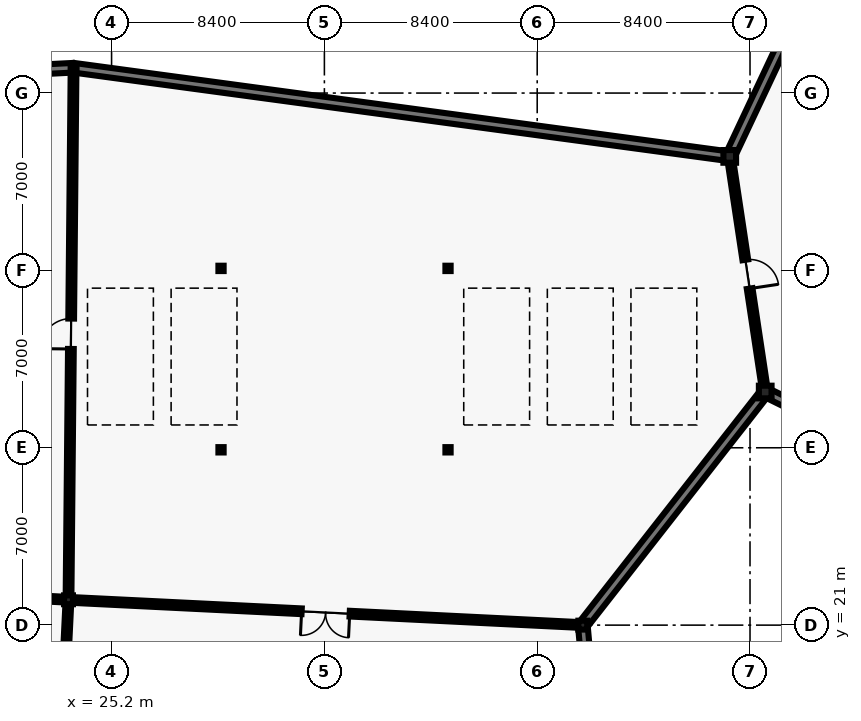
"""IFC4 building model, lengths in metres.
Left out: names, types, materials, properties, quantities, classifications, styles, units other than length and angle.
Written with IfcOpenShell. Run it as: python <this file> out.ifc"""

import sys

from ifc_helpers import new_model, si_unit, direction, frame, frame_2d, origin, origin_2d, place, context, subcontext, project, spatial, rectangle, i_section, extrude, element, fill, save


model = new_model("IFC4")
c1 = context("Model", 3, precision=1e-05, world=origin(), true_north=direction((0.0, 1.0)))
c2 = subcontext(c1, "Body", "Model", "MODEL_VIEW")
j1 = project(units=[si_unit("LENGTHUNIT", "METRE"), si_unit("PLANEANGLEUNIT", "RADIAN")], contexts=[c1])
p1 = place(None, origin())
s1 = spatial("IfcSite", under=j1, at=p1, CompositionType="ELEMENT")
p2 = place(p1, origin())
s2 = spatial("IfcBuilding", under=s1, at=p2, CompositionType="ELEMENT")
p3 = place(p2, frame((0.0, 0.0, -4.5)))
s3 = spatial("IfcBuildingStorey", under=s2, at=p3, CompositionType="ELEMENT", Elevation=-4.5)
p4 = place(p3, frame((23.5, 22.0, 0.0), z_axis=(0.0, 0.0, 1.0), x_axis=(1.0, 0.0, 0.0)))
e1 = element("IfcColumn", 1, at=p4, inside=s3, PredefinedType="COLUMN", context=c2, shape_type="SweptSolid", body=[
    extrude(i_section(OverallWidth=0.35, OverallDepth=0.35, WebThickness=0.02, FlangeThickness=0.028, at=origin_2d()), origin(), (0.0, 0.0, 1.0), 4.5),
])
p5 = place(p3, frame((23.7, 43.0, 0.0), z_axis=(0.0, 0.0, 1.0), x_axis=(1.0, 0.0, 0.0)))
e2 = element("IfcColumn", 2, at=p5, inside=s3, PredefinedType="COLUMN", context=c2, shape_type="SweptSolid", body=[
    extrude(i_section(OverallWidth=0.205, OverallDepth=0.21, WebThickness=0.009, FlangeThickness=0.014, FilletRadius=0.01, at=origin_2d()), origin(), (0.0, 0.0, 1.0), 4.5),
])
p6 = place(p3, frame((43.8, 21.0, 0.0), z_axis=(0.0, 0.0, 1.0), x_axis=(1.0, 0.0, 0.0)))
e3 = element("IfcColumn", 3, at=p6, inside=s3, PredefinedType="COLUMN", context=c2, shape_type="SweptSolid", body=[
    extrude(i_section(OverallWidth=0.35, OverallDepth=0.35, WebThickness=0.02, FlangeThickness=0.028, at=origin_2d()), origin(), (0.0, 0.0, 1.0), 4.5),
])
for number, where, z_axis, x_axis in (
    (4, (49.6, 39.5, 0.0), (0.0, 0.0, 1.0), (1.0, 0.0, 0.0)),
    (5, (51.0, 30.2, 0.0), (0.0, 0.0, 1.0), (1.0, 0.0, 0.0)),
):
    element("IfcColumn", number, at=place(p3, frame(where, z_axis=z_axis, x_axis=x_axis)), inside=s3, PredefinedType="COLUMN", context=c2, shape_type="SweptSolid", body=[
        extrude(i_section(OverallWidth=0.5, OverallDepth=0.5, WebThickness=0.022, FlangeThickness=0.036, at=origin_2d()), origin(), (0.0, 0.0, 1.0), 4.5),
    ])
for number, where, z_axis, x_axis in (
    (6, (29.52, 27.92, 0.0), (0.0, 0.0, 1.0), (1.0, 0.0, 0.0)),
    (7, (38.48, 27.92, 0.0), (0.0, 0.0, 1.0), (1.0, 0.0, 0.0)),
    (8, (38.48, 35.08, 0.0), (0.0, 0.0, 1.0), (1.0, 0.0, 0.0)),
    (9, (29.52, 35.08, 0.0), (0.0, 0.0, 1.0), (1.0, 0.0, 0.0)),
):
    element("IfcColumn", number, at=place(p3, frame(where, z_axis=z_axis, x_axis=x_axis)), inside=s3, PredefinedType="COLUMN", context=c2, shape_type="SweptSolid", body=[
        extrude(i_section(OverallWidth=0.205, OverallDepth=0.21, WebThickness=0.009, FlangeThickness=0.014, FilletRadius=0.01, at=origin_2d()), origin(), (0.0, 0.0, 1.0), 4.5),
    ])
p7 = place(p3, frame((51.045, 30.178, 0.0), z_axis=(0.0, 0.0, 1.0), x_axis=(0.896803716147, -0.442428632329, 0.0)))
e10 = element("IfcWall", 10, at=p7, inside=s3, PredefinedType="USERDEFINED", context=c2, shape_type="SweptSolid", body=[
    extrude(rectangle(XDim=16.676, YDim=0.38, at=frame_2d((8.338, 0.0))), origin(), (0.0, 0.0, 1.0), 4.14),
])
p8 = place(p3, frame((51.979, 44.555, 0.0), z_axis=(0.0, 0.0, 1.0), x_axis=(-0.42583525687, -0.904800715078, 0.0)))
e11 = element("IfcWall", 11, at=p8, inside=s3, PredefinedType="USERDEFINED", context=c2, shape_type="SweptSolid", body=[
    extrude(rectangle(XDim=5.537, YDim=0.38, at=frame_2d((2.769, 0.0))), origin(), (0.0, 0.0, 1.0), 4.14),
])
p9 = place(p3, frame((45.1, 6.6, 0.0), z_axis=(0.0, 0.0, 1.0), x_axis=(-0.089958229703, 0.995945539128, 0.0)))
e12 = element("IfcWall", 12, at=p9, inside=s3, PredefinedType="USERDEFINED", context=c2, shape_type="SweptSolid", body=[
    extrude(rectangle(XDim=14.408, YDim=0.38, at=frame_2d((7.204, 0.0))), origin(), (0.0, 0.0, 1.0), 4.14),
])
p10 = place(p3, frame((23.65, 42.997, 0.0), z_axis=(0.0, 0.0, 1.0), x_axis=(-0.998721555916, -0.050549517793, 0.0)))
e13 = element("IfcWall", 13, at=p10, inside=s3, PredefinedType="USERDEFINED", context=c2, shape_type="SweptSolid", body=[
    extrude(rectangle(XDim=23.68, YDim=0.38, at=frame_2d((11.84, 0.0))), origin(), (0.0, 0.0, 1.0), 4.14),
])
p11 = place(p3, frame((43.831, 21.039, 0.0), z_axis=(0.0, 0.0, 1.0), x_axis=(0.616261088059, 0.787541917199, 0.0)))
e14 = element("IfcWall", 14, at=p11, inside=s3, PredefinedType="USERDEFINED", context=c2, shape_type="SweptSolid", body=[
    extrude(rectangle(XDim=11.583, YDim=0.38, at=frame_2d((5.792, 0.0))), origin(), (0.0, 0.0, 1.0), 4.14),
])
p12 = place(p3, frame((49.55, 39.507, 0.0), z_axis=(0.0, 0.0, 1.0), x_axis=(-0.990995760024, 0.133893254555, 0.0)))
e15 = element("IfcWall", 15, at=p12, inside=s3, PredefinedType="USERDEFINED", context=c2, shape_type="SweptSolid", body=[
    extrude(rectangle(XDim=26.034, YDim=0.38, at=frame_2d((13.017, 0.0))), origin(), (0.0, 0.0, 1.0), 4.14),
])
p13 = place(p3, frame((49.6, 39.5, 0.0), z_axis=(0.0, 0.0, 1.0), x_axis=(0.148849460064, -0.988859867847, 0.0)))
e16 = element("IfcWall", 16, at=p13, inside=s3, PredefinedType="SOLIDWALL", context=c2, shape_type="SweptSolid", body=[
    extrude(rectangle(XDim=9.405, YDim=0.225, at=frame_2d((4.702, 0.0))), origin(), (0.0, 0.0, 1.0), 4.14),
])
p14 = place(p13, frame((4.127, 0.0, 0.0)))
e17 = element("IfcOpeningElement", 17, at=p14, cuts=e16, PredefinedType="OPENING", context=c2, shape_type="SweptSolid", body=[
    extrude(rectangle(XDim=1.15, YDim=2.2, at=frame_2d((0.575, 1.1))), frame((0.0, 0.123, 0.0), z_axis=(0.0, -1.0, 0.0), x_axis=(1.0, 0.0, 0.0)), (0.0, 0.0, 1.0), 0.245),
])
p15 = place(p3, frame((22.6, 3.5, 0.0), z_axis=(0.0, 0.0, 1.0), x_axis=(0.048585922438, 0.998819006698, 0.0)))
e18 = element("IfcWall", 18, at=p15, inside=s3, PredefinedType="SOLIDWALL", context=c2, shape_type="SweptSolid", body=[
    extrude(rectangle(XDim=18.522, YDim=0.225, at=frame_2d((9.261, 0.0))), origin(), (0.0, 0.0, 1.0), 4.14),
])
p16 = place(p3, frame((23.5, 22.0, 0.0), z_axis=(0.0, 0.0, 1.0), x_axis=(-0.99872706092, 0.050440636263, 0.0)))
e19 = element("IfcWall", 19, at=p16, inside=s3, PredefinedType="SOLIDWALL", context=c2, shape_type="SweptSolid", body=[
    extrude(rectangle(XDim=19.825, YDim=0.225, at=frame_2d((9.913, 0.0))), origin(), (0.0, 0.0, 1.0), 4.14),
])
p17 = place(p16, frame((8.963, 0.0, 0.0)))
e20 = element("IfcOpeningElement", 20, at=p17, cuts=e19, PredefinedType="OPENING", context=c2, shape_type="SweptSolid", body=[
    extrude(rectangle(XDim=1.9, YDim=2.35, at=frame_2d((0.95, 1.175))), frame((0.0, 0.123, 0.0), z_axis=(0.0, -1.0, 0.0), x_axis=(1.0, 0.0, 0.0)), (0.0, 0.0, 1.0), 0.245),
])
p18 = place(p3, frame((43.8, 21.0, 0.0), z_axis=(0.0, 0.0, 1.0), x_axis=(-0.998788882418, 0.049201304434, 0.0)))
e21 = element("IfcWall", 21, at=p18, inside=s3, PredefinedType="SOLIDWALL", context=c2, shape_type="SweptSolid", body=[
    extrude(rectangle(XDim=20.325, YDim=0.225, at=frame_2d((10.162, 0.0))), origin(), (0.0, 0.0, 1.0), 4.14),
])
p19 = place(p18, frame((9.212, 0.0, 0.0)))
e22 = element("IfcOpeningElement", 22, at=p19, cuts=e21, PredefinedType="OPENING", context=c2, shape_type="SweptSolid", body=[
    extrude(rectangle(XDim=1.9, YDim=2.35, at=frame_2d((0.95, 1.175))), frame((0.0, 0.123, 0.0), z_axis=(0.0, -1.0, 0.0), x_axis=(1.0, 0.0, 0.0)), (0.0, 0.0, 1.0), 0.245),
])
p20 = place(p3, frame((23.5, 22.0, 0.0), z_axis=(0.0, 0.0, 1.0), x_axis=(0.009521052802, 0.99995467375, 0.0)))
e23 = element("IfcWall", 23, at=p20, inside=s3, PredefinedType="SOLIDWALL", context=c2, shape_type="SweptSolid", body=[
    extrude(rectangle(XDim=21.001, YDim=0.225, at=frame_2d((10.5, 0.0))), origin(), (0.0, 0.0, 1.0), 4.14),
])
p21 = place(p20, frame((9.9, 0.0, 0.0)))
e24 = element("IfcOpeningElement", 24, at=p21, cuts=e23, PredefinedType="OPENING", context=c2, shape_type="SweptSolid", body=[
    extrude(rectangle(XDim=1.2, YDim=2.2, at=frame_2d((0.6, 1.1))), frame((0.0, 0.123, 0.0), z_axis=(0.0, -1.0, 0.0), x_axis=(1.0, 0.0, 0.0)), (0.0, 0.0, 1.0), 0.245),
])
p22 = place(p14, origin())
e25 = element("IfcDoor", 25, at=p22, inside=s3, OperationType="SINGLE_SWING_RIGHT", PredefinedType="DOOR", context=c2, shape_type="SweptSolid", body=[
    extrude(rectangle(XDim=1.15, YDim=2.2, at=frame_2d((0.575, 1.1))), frame((0.0, 0.025, 0.0), z_axis=(0.0, -1.0, 0.0), x_axis=(1.0, 0.0, 0.0)), (0.0, 0.0, 1.0), 0.05),
])
fill(e17, e25)
p23 = place(p19, origin())
e26 = element("IfcDoor", 26, at=p23, inside=s3, OperationType="DOUBLE_DOOR_SINGLE_SWING", PredefinedType="DOOR", context=c2, shape_type="SweptSolid", body=[
    extrude(rectangle(XDim=1.9, YDim=2.35, at=frame_2d((0.95, 1.175))), frame((0.0, 0.025, 0.0), z_axis=(0.0, -1.0, 0.0), x_axis=(1.0, 0.0, 0.0)), (0.0, 0.0, 1.0), 0.05),
])
fill(e22, e26)
p24 = place(p21, origin())
e27 = element("IfcDoor", 27, at=p24, inside=s3, OperationType="SINGLE_SWING_LEFT", PredefinedType="DOOR", context=c2, shape_type="SweptSolid", body=[
    extrude(rectangle(XDim=1.2, YDim=2.2, at=frame_2d((0.6, 1.1))), frame((0.0, 0.025, 0.0), z_axis=(0.0, -1.0, 0.0), x_axis=(1.0, 0.0, 0.0)), (0.0, 0.0, 1.0), 0.05),
])
fill(e24, e27)
save(model, sys.argv[1])
